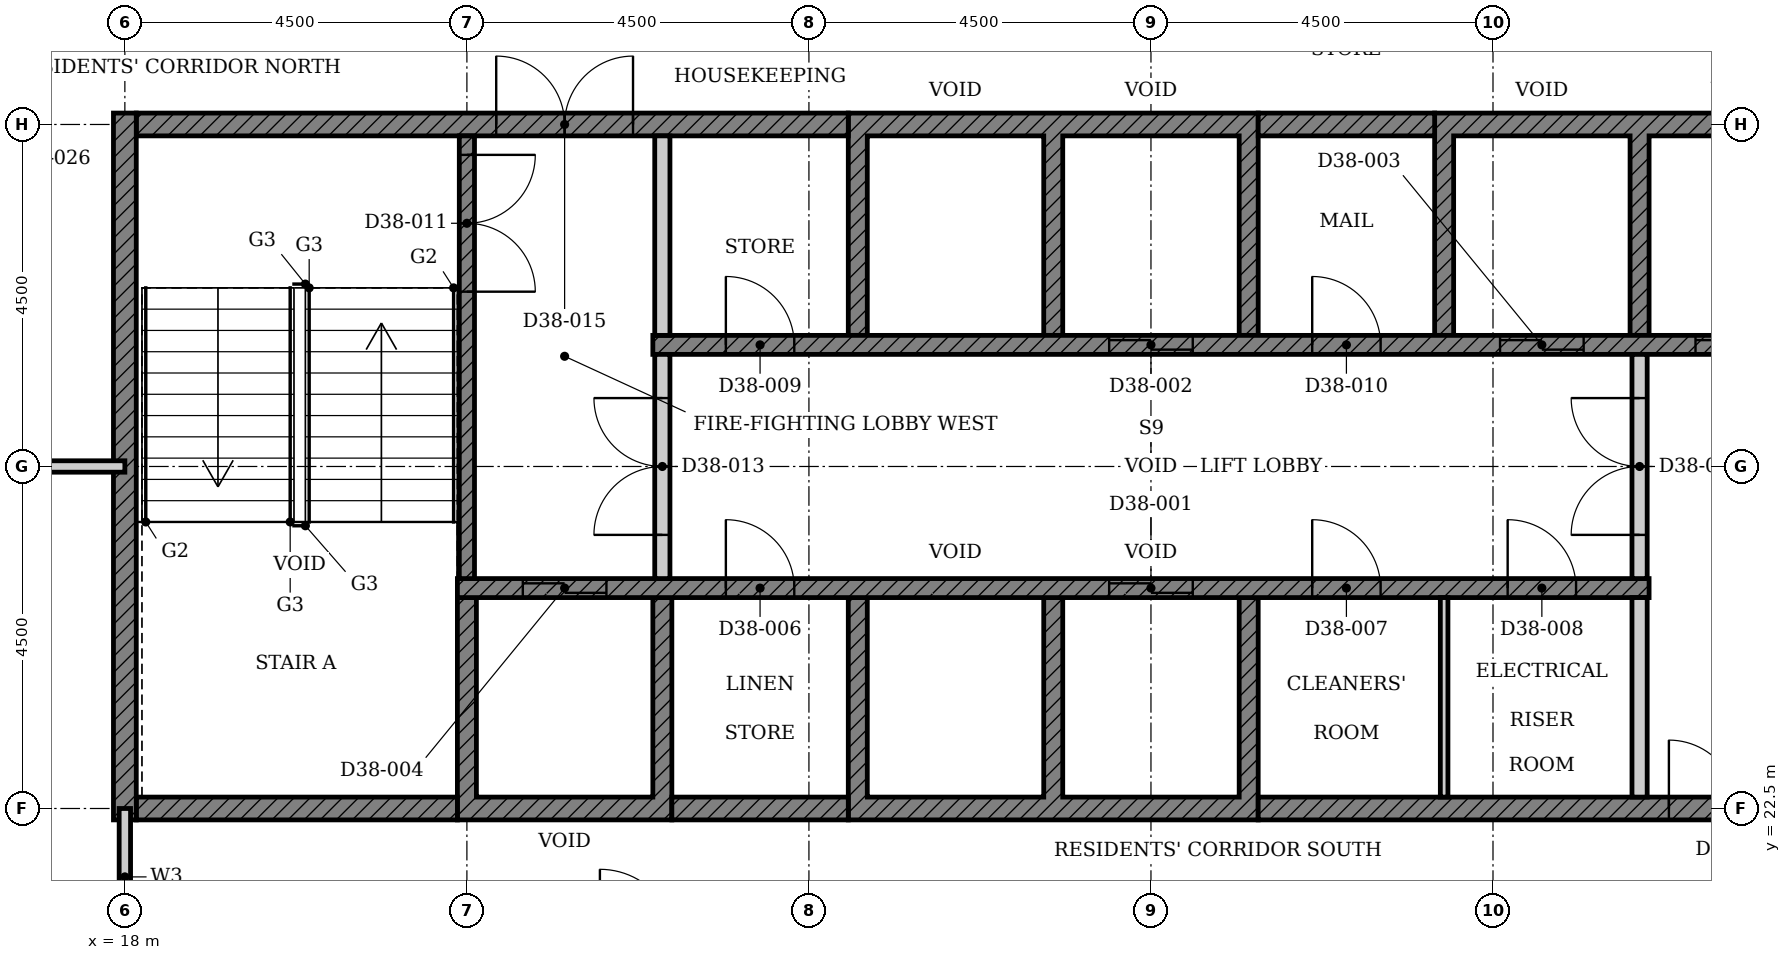
"""IFC4 building model, lengths in metres.
Left out: names, types, materials, properties, quantities, classifications, styles, units other than length and angle.
Written with IfcOpenShell. Run it as: python <this file> out.ifc"""

import sys

from ifc_helpers import new_model, si_unit, direction, frame, frame_2d, origin, place, context, subcontext, project, spatial, polyline, rectangle, outline, extrude, element, fill, save


model = new_model("IFC4")
c1 = context("Model", 3, precision=1e-05, world=origin(), true_north=direction((0.0, 1.0)))
c2 = subcontext(c1, "Body", "Model", "MODEL_VIEW")
j1 = project(units=[si_unit("LENGTHUNIT", "METRE"), si_unit("PLANEANGLEUNIT", "RADIAN")], contexts=[c1])
p1 = place(None, origin())
s1 = spatial("IfcSite", under=j1, at=p1, CompositionType="ELEMENT")
p2 = place(p1, origin())
s2 = spatial("IfcBuilding", under=s1, at=p2, CompositionType="ELEMENT")
p3 = place(p2, frame((0.0, 0.0, 154.3)))
s3 = spatial("IfcBuildingStorey", under=s2, at=p3, CompositionType="ELEMENT", Elevation=154.3)
p4 = place(p3, origin())
e1 = element("IfcWall", 1, at=p4, inside=s3, PredefinedType="SHEAR", context=c2, shape_type="SweptSolid", body=[
    extrude(outline(polyline([(22.375, 22.35), (25.197, 22.35), (25.197, 25.275), (24.947, 25.275), (24.947, 22.65), (22.625, 22.65), (22.625, 25.275), (22.375, 25.275), (22.375, 22.35)])), origin(), (0.0, 0.0, 1.0), 3.4),
])
p5 = place(p3, origin())
e2 = element("IfcWall", 2, at=p5, inside=s3, PredefinedType="SHEAR", context=c2, shape_type="SweptSolid", body=[
    extrude(outline(polyline([(27.518, 22.35), (32.911, 22.35), (32.911, 25.275), (32.661, 25.275), (32.661, 22.65), (30.339, 22.65), (30.339, 25.275), (30.089, 25.275), (30.089, 22.65), (27.768, 22.65), (27.768, 25.275), (27.518, 25.275), (27.518, 22.35)])), origin(), (0.0, 0.0, 1.0), 3.4),
])
p6 = place(p3, origin())
e3 = element("IfcWall", 3, at=p6, inside=s3, PredefinedType="SHEAR", context=c2, shape_type="SweptSolid", body=[
    extrude(outline(polyline([(27.518, 28.725), (27.768, 28.725), (27.768, 31.35), (30.089, 31.35), (30.089, 28.725), (30.339, 28.725), (30.339, 31.35), (32.661, 31.35), (32.661, 28.725), (32.911, 28.725), (32.911, 31.65), (27.518, 31.65), (27.518, 28.725)])), origin(), (0.0, 0.0, 1.0), 3.4),
])
p7 = place(p3, origin())
e4 = element("IfcWall", 4, at=p7, inside=s3, PredefinedType="SHEAR", context=c2, shape_type="SweptSolid", body=[
    extrude(outline(polyline([(35.232, 28.725), (35.482, 28.725), (35.482, 31.35), (37.803, 31.35), (37.803, 28.725), (38.053, 28.725), (38.053, 31.35), (40.375, 31.35), (40.375, 28.725), (40.625, 28.725), (40.625, 31.65), (35.232, 31.65), (35.232, 28.725)])), origin(), (0.0, 0.0, 1.0), 3.4),
])
p8 = place(p3, frame((18.15, 22.5, 0.0), z_axis=(0.0, 0.0, 1.0), x_axis=(1.0, 0.0, 0.0)))
e5 = element("IfcWall", 5, at=p8, inside=s3, PredefinedType="SHEAR", context=c2, shape_type="SweptSolid", body=[
    extrude(rectangle(XDim=4.225, YDim=0.3, at=frame_2d((2.113, 0.0))), origin(), (0.0, 0.0, 1.0), 3.4),
])
p9 = place(p3, frame((25.197, 22.5, 0.0), z_axis=(0.0, 0.0, 1.0), x_axis=(1.0, 0.0, 0.0)))
e6 = element("IfcWall", 6, at=p9, inside=s3, PredefinedType="SHEAR", context=c2, shape_type="SweptSolid", body=[
    extrude(rectangle(XDim=2.321, YDim=0.3, at=frame_2d((1.161, 0.0))), origin(), (0.0, 0.0, 1.0), 3.4),
])
p10 = place(p3, frame((32.911, 22.5, 0.0), z_axis=(0.0, 0.0, 1.0), x_axis=(1.0, 0.0, 0.0)))
e7 = element("IfcWall", 7, at=p10, inside=s3, PredefinedType="SHEAR", context=c2, shape_type="SweptSolid", body=[
    extrude(rectangle(XDim=11.939, YDim=0.3, at=frame_2d((5.97, 0.0))), origin(), (0.0, 0.0, 1.0), 3.4),
])
p11 = place(p10, frame((5.404, 0.0, 0.0)))
e8 = element("IfcOpeningElement", 8, at=p11, cuts=e7, PredefinedType="OPENING", context=c2, shape_type="SweptSolid", body=[
    extrude(rectangle(XDim=1.8, YDim=2.1, at=frame_2d((0.9, 1.05))), frame((0.0, 0.16, 0.0), z_axis=(0.0, -1.0, 0.0), x_axis=(1.0, 0.0, 0.0)), (0.0, 0.0, 1.0), 0.32),
])
p12 = place(p3, frame((18.15, 31.5, 0.0), z_axis=(0.0, 0.0, 1.0), x_axis=(1.0, 0.0, 0.0)))
e9 = element("IfcWall", 9, at=p12, inside=s3, PredefinedType="SHEAR", context=c2, shape_type="SweptSolid", body=[
    extrude(rectangle(XDim=9.368, YDim=0.3, at=frame_2d((4.684, 0.0))), origin(), (0.0, 0.0, 1.0), 3.4),
])
p13 = place(p12, frame((4.736, 0.0, 0.0)))
e10 = element("IfcOpeningElement", 10, at=p13, cuts=e9, PredefinedType="OPENING", context=c2, shape_type="SweptSolid", body=[
    extrude(rectangle(XDim=1.8, YDim=2.1, at=frame_2d((0.9, 1.05))), frame((0.0, 0.16, 0.0), z_axis=(0.0, -1.0, 0.0), x_axis=(1.0, 0.0, 0.0)), (0.0, 0.0, 1.0), 0.32),
])
p14 = place(p3, frame((32.911, 31.5, 0.0), z_axis=(0.0, 0.0, 1.0), x_axis=(1.0, 0.0, 0.0)))
e11 = element("IfcWall", 11, at=p14, inside=s3, PredefinedType="SHEAR", context=c2, shape_type="SweptSolid", body=[
    extrude(rectangle(XDim=2.322, YDim=0.3, at=frame_2d((1.161, 0.0))), origin(), (0.0, 0.0, 1.0), 3.4),
])
p15 = place(p3, frame((18.0, 22.35, 0.0), z_axis=(0.0, 0.0, 1.0), x_axis=(0.0, 1.0, 0.0)))
e12 = element("IfcWall", 12, at=p15, inside=s3, PredefinedType="SHEAR", context=c2, shape_type="SweptSolid", body=[
    extrude(rectangle(XDim=9.3, YDim=0.3, at=frame_2d((4.65, 0.0))), origin(), (0.0, 0.0, 1.0), 3.4),
])
p16 = place(p3, frame((22.375, 25.4, 0.0), z_axis=(0.0, 0.0, 1.0), x_axis=(1.0, 0.0, 0.0)))
e13 = element("IfcWall", 13, at=p16, inside=s3, PredefinedType="SHEAR", context=c2, shape_type="SweptSolid", body=[
    extrude(rectangle(XDim=15.678, YDim=0.25, at=frame_2d((7.839, 0.0))), origin(), (0.0, 0.0, 1.0), 3.4),
])
p17 = place(p16, frame((8.575, 0.0, 0.0)))
e14 = element("IfcOpeningElement", 14, at=p17, cuts=e13, PredefinedType="OPENING", context=c2, shape_type="SweptSolid", body=[
    extrude(rectangle(XDim=1.1, YDim=2.1, at=frame_2d((0.55, 1.05))), frame((0.0, 0.135, 0.0), z_axis=(0.0, -1.0, 0.0), x_axis=(1.0, 0.0, 0.0)), (0.0, 0.0, 1.0), 0.27),
])
p18 = place(p16, frame((0.861, 0.0, 0.0)))
e15 = element("IfcOpeningElement", 15, at=p18, cuts=e13, PredefinedType="OPENING", context=c2, shape_type="SweptSolid", body=[
    extrude(rectangle(XDim=1.1, YDim=2.1, at=frame_2d((0.55, 1.05))), frame((0.0, 0.135, 0.0), z_axis=(0.0, -1.0, 0.0), x_axis=(1.0, 0.0, 0.0)), (0.0, 0.0, 1.0), 0.27),
])
p19 = place(p16, frame((3.532, 0.0, 0.0)))
e16 = element("IfcOpeningElement", 16, at=p19, cuts=e13, PredefinedType="OPENING", context=c2, shape_type="SweptSolid", body=[
    extrude(rectangle(XDim=0.9, YDim=2.1, at=frame_2d((0.45, 1.05))), frame((0.0, 0.135, 0.0), z_axis=(0.0, -1.0, 0.0), x_axis=(1.0, 0.0, 0.0)), (0.0, 0.0, 1.0), 0.27),
])
p20 = place(p16, frame((11.246, 0.0, 0.0)))
e17 = element("IfcOpeningElement", 17, at=p20, cuts=e13, PredefinedType="OPENING", context=c2, shape_type="SweptSolid", body=[
    extrude(rectangle(XDim=0.9, YDim=2.1, at=frame_2d((0.45, 1.05))), frame((0.0, 0.135, 0.0), z_axis=(0.0, -1.0, 0.0), x_axis=(1.0, 0.0, 0.0)), (0.0, 0.0, 1.0), 0.27),
])
p21 = place(p16, frame((13.818, 0.0, 0.0)))
e18 = element("IfcOpeningElement", 18, at=p21, cuts=e13, PredefinedType="OPENING", context=c2, shape_type="SweptSolid", body=[
    extrude(rectangle(XDim=0.9, YDim=2.1, at=frame_2d((0.45, 1.05))), frame((0.0, 0.135, 0.0), z_axis=(0.0, -1.0, 0.0), x_axis=(1.0, 0.0, 0.0)), (0.0, 0.0, 1.0), 0.27),
])
p22 = place(p3, frame((24.947, 28.6, 0.0), z_axis=(0.0, 0.0, 1.0), x_axis=(1.0, 0.0, 0.0)))
e19 = element("IfcWall", 19, at=p22, inside=s3, PredefinedType="SHEAR", context=c2, shape_type="SweptSolid", body=[
    extrude(rectangle(XDim=15.678, YDim=0.25, at=frame_2d((7.839, 0.0))), origin(), (0.0, 0.0, 1.0), 3.4),
])
p23 = place(p22, frame((6.004, 0.0, 0.0)))
e20 = element("IfcOpeningElement", 20, at=p23, cuts=e19, PredefinedType="OPENING", context=c2, shape_type="SweptSolid", body=[
    extrude(rectangle(XDim=1.1, YDim=2.1, at=frame_2d((0.55, 1.05))), frame((0.0, 0.135, 0.0), z_axis=(0.0, -1.0, 0.0), x_axis=(1.0, 0.0, 0.0)), (0.0, 0.0, 1.0), 0.27),
])
p24 = place(p22, frame((11.146, 0.0, 0.0)))
e21 = element("IfcOpeningElement", 21, at=p24, cuts=e19, PredefinedType="OPENING", context=c2, shape_type="SweptSolid", body=[
    extrude(rectangle(XDim=1.1, YDim=2.1, at=frame_2d((0.55, 1.05))), frame((0.0, 0.135, 0.0), z_axis=(0.0, -1.0, 0.0), x_axis=(1.0, 0.0, 0.0)), (0.0, 0.0, 1.0), 0.27),
])
p25 = place(p22, frame((13.718, 0.0, 0.0)))
e22 = element("IfcOpeningElement", 22, at=p25, cuts=e19, PredefinedType="OPENING", context=c2, shape_type="SweptSolid", body=[
    extrude(rectangle(XDim=1.1, YDim=2.1, at=frame_2d((0.55, 1.05))), frame((0.0, 0.135, 0.0), z_axis=(0.0, -1.0, 0.0), x_axis=(1.0, 0.0, 0.0)), (0.0, 0.0, 1.0), 0.27),
])
p26 = place(p22, frame((0.961, 0.0, 0.0)))
e23 = element("IfcOpeningElement", 23, at=p26, cuts=e19, PredefinedType="OPENING", context=c2, shape_type="SweptSolid", body=[
    extrude(rectangle(XDim=0.9, YDim=2.1, at=frame_2d((0.45, 1.05))), frame((0.0, 0.135, 0.0), z_axis=(0.0, -1.0, 0.0), x_axis=(1.0, 0.0, 0.0)), (0.0, 0.0, 1.0), 0.27),
])
p27 = place(p22, frame((8.675, 0.0, 0.0)))
e24 = element("IfcOpeningElement", 24, at=p27, cuts=e19, PredefinedType="OPENING", context=c2, shape_type="SweptSolid", body=[
    extrude(rectangle(XDim=0.9, YDim=2.1, at=frame_2d((0.45, 1.05))), frame((0.0, 0.135, 0.0), z_axis=(0.0, -1.0, 0.0), x_axis=(1.0, 0.0, 0.0)), (0.0, 0.0, 1.0), 0.27),
])
p28 = place(p3, frame((37.928, 22.65, 0.0), z_axis=(0.0, 0.0, 1.0), x_axis=(0.0, 1.0, 0.0)))
e25 = element("IfcWall", 25, at=p28, inside=s3, PredefinedType="PARTITIONING", context=c2, shape_type="SweptSolid", body=[
    extrude(rectangle(XDim=2.625, YDim=0.2, at=frame_2d((1.312, 0.0))), origin(), (0.0, 0.0, 1.0), 3.4),
])
p29 = place(p3, frame((35.357, 22.65, 0.0), z_axis=(0.0, 0.0, 1.0), x_axis=(0.0, 1.0, 0.0)))
e26 = element("IfcWall", 26, at=p29, inside=s3, PredefinedType="PARTITIONING", context=c2, shape_type="SweptSolid", body=[
    extrude(rectangle(XDim=2.625, YDim=0.1, at=frame_2d((1.312, 0.0))), origin(), (0.0, 0.0, 1.0), 3.4),
])
p30 = place(p3, frame((25.072, 28.725, 0.0), z_axis=(0.0, 0.0, 1.0), x_axis=(0.0, 1.0, 0.0)))
e27 = element("IfcWall", 27, at=p30, inside=s3, PredefinedType="PARTITIONING", context=c2, shape_type="SweptSolid", body=[
    extrude(rectangle(XDim=2.625, YDim=0.2, at=frame_2d((1.312, 0.0))), origin(), (0.0, 0.0, 1.0), 3.4),
])
p31 = place(p3, frame((22.5, 31.35, 0.0), z_axis=(0.0, 0.0, 1.0), x_axis=(0.0, -1.0, 0.0)))
e28 = element("IfcWall", 28, at=p31, inside=s3, PredefinedType="SHEAR", context=c2, shape_type="SweptSolid", body=[
    extrude(rectangle(XDim=5.825, YDim=0.2, at=frame_2d((2.913, 0.0))), origin(), (0.0, 0.0, 1.0), 3.4),
])
p32 = place(p31, frame((0.25, 0.0, 0.0)))
e29 = element("IfcOpeningElement", 29, at=p32, cuts=e28, PredefinedType="OPENING", context=c2, shape_type="SweptSolid", body=[
    extrude(rectangle(XDim=1.8, YDim=2.1, at=frame_2d((0.9, 1.05))), frame((0.0, 0.11, 0.0), z_axis=(0.0, -1.0, 0.0), x_axis=(1.0, 0.0, 0.0)), (0.0, 0.0, 1.0), 0.22),
])
p33 = place(p3, frame((25.072, 25.525, 0.0), z_axis=(0.0, 0.0, 1.0), x_axis=(0.0, 1.0, 0.0)))
e30 = element("IfcWall", 30, at=p33, inside=s3, PredefinedType="PARTITIONING", context=c2, shape_type="SweptSolid", body=[
    extrude(rectangle(XDim=2.95, YDim=0.2, at=frame_2d((1.475, 0.0))), origin(), (0.0, 0.0, 1.0), 3.4),
])
p34 = place(p33, frame((0.575, 0.0, 0.0)))
e31 = element("IfcOpeningElement", 31, at=p34, cuts=e30, PredefinedType="OPENING", context=c2, shape_type="SweptSolid", body=[
    extrude(rectangle(XDim=1.8, YDim=2.1, at=frame_2d((0.9, 1.05))), frame((0.0, 0.11, 0.0), z_axis=(0.0, -1.0, 0.0), x_axis=(1.0, 0.0, 0.0)), (0.0, 0.0, 1.0), 0.22),
])
p35 = place(p3, frame((37.928, 25.525, 0.0), z_axis=(0.0, 0.0, 1.0), x_axis=(0.0, 1.0, 0.0)))
e32 = element("IfcWall", 32, at=p35, inside=s3, PredefinedType="PARTITIONING", context=c2, shape_type="SweptSolid", body=[
    extrude(rectangle(XDim=2.95, YDim=0.2, at=frame_2d((1.475, 0.0))), origin(), (0.0, 0.0, 1.0), 3.4),
])
p36 = place(p35, frame((0.575, 0.0, 0.0)))
e33 = element("IfcOpeningElement", 33, at=p36, cuts=e32, PredefinedType="OPENING", context=c2, shape_type="SweptSolid", body=[
    extrude(rectangle(XDim=1.8, YDim=2.1, at=frame_2d((0.9, 1.05))), frame((0.0, 0.11, 0.0), z_axis=(0.0, -1.0, 0.0), x_axis=(1.0, 0.0, 0.0)), (0.0, 0.0, 1.0), 0.22),
])
p37 = place(p3, frame((4.5, 27.0, 0.0), z_axis=(0.0, 0.0, 1.0), x_axis=(1.0, 0.0, 0.0)))
e34 = element("IfcWall", 34, at=p37, inside=s3, PredefinedType="PARTITIONING", context=c2, shape_type="SweptSolid", body=[
    extrude(rectangle(XDim=13.5, YDim=0.15, at=frame_2d((6.75, 0.0))), origin(), (0.0, 0.0, 1.0), 2.68),
])
p38 = place(p37, frame((5.35, 0.0, 0.0)))
e35 = element("IfcOpeningElement", 35, at=p38, cuts=e34, PredefinedType="OPENING", context=c2, shape_type="SweptSolid", body=[
    extrude(rectangle(XDim=1.0, YDim=2.1, at=frame_2d((0.5, 1.05))), frame((0.0, 0.085, 0.0), z_axis=(0.0, -1.0, 0.0), x_axis=(1.0, 0.0, 0.0)), (0.0, 0.0, 1.0), 0.17),
])
p39 = place(p3, frame((18.0, 20.7, 0.0), z_axis=(0.0, 0.0, 1.0), x_axis=(0.0, 1.0, 0.0)))
e36 = element("IfcWall", 36, at=p39, inside=s3, PredefinedType="PARTITIONING", context=c2, shape_type="SweptSolid", body=[
    extrude(rectangle(XDim=1.8, YDim=0.15, at=frame_2d((0.9, 0.0))), origin(), (0.0, 0.0, 1.0), 3.4),
])
p40 = place(p17, origin())
e37 = element("IfcDoor", 37, at=p40, inside=s3, OperationType="DOUBLE_DOOR_SLIDING", PredefinedType="DOOR", context=c2, shape_type="SweptSolid", body=[
    extrude(rectangle(XDim=1.1, YDim=2.1, at=frame_2d((0.55, 1.05))), frame((0.0, 0.025, 0.0), z_axis=(0.0, -1.0, 0.0), x_axis=(1.0, 0.0, 0.0)), (0.0, 0.0, 1.0), 0.05),
])
fill(e14, e37)
p41 = place(p23, origin())
e38 = element("IfcDoor", 38, at=p41, inside=s3, OperationType="DOUBLE_DOOR_SLIDING", PredefinedType="DOOR", context=c2, shape_type="SweptSolid", body=[
    extrude(rectangle(XDim=1.1, YDim=2.1, at=frame_2d((0.55, 1.05))), frame((0.0, 0.025, 0.0), z_axis=(0.0, -1.0, 0.0), x_axis=(1.0, 0.0, 0.0)), (0.0, 0.0, 1.0), 0.05),
])
fill(e20, e38)
p42 = place(p24, origin())
e39 = element("IfcDoor", 39, at=p42, inside=s3, OperationType="DOUBLE_DOOR_SLIDING", PredefinedType="DOOR", context=c2, shape_type="SweptSolid", body=[
    extrude(rectangle(XDim=1.1, YDim=2.1, at=frame_2d((0.55, 1.05))), frame((0.0, 0.025, 0.0), z_axis=(0.0, -1.0, 0.0), x_axis=(1.0, 0.0, 0.0)), (0.0, 0.0, 1.0), 0.05),
])
fill(e21, e39)
p43 = place(p18, origin())
e40 = element("IfcDoor", 40, at=p43, inside=s3, OperationType="DOUBLE_DOOR_SLIDING", PredefinedType="DOOR", context=c2, shape_type="SweptSolid", body=[
    extrude(rectangle(XDim=1.1, YDim=2.1, at=frame_2d((0.55, 1.05))), frame((0.0, 0.025, 0.0), z_axis=(0.0, -1.0, 0.0), x_axis=(1.0, 0.0, 0.0)), (0.0, 0.0, 1.0), 0.05),
])
fill(e15, e40)
p44 = place(p25, origin())
e41 = element("IfcDoor", 41, at=p44, inside=s3, OperationType="DOUBLE_DOOR_SLIDING", PredefinedType="DOOR", context=c2, shape_type="SweptSolid", body=[
    extrude(rectangle(XDim=1.1, YDim=2.1, at=frame_2d((0.55, 1.05))), frame((0.0, 0.025, 0.0), z_axis=(0.0, -1.0, 0.0), x_axis=(1.0, 0.0, 0.0)), (0.0, 0.0, 1.0), 0.05),
])
fill(e22, e41)
p45 = place(p19, origin())
e42 = element("IfcDoor", 42, at=p45, inside=s3, OperationType="SINGLE_SWING_LEFT", PredefinedType="DOOR", context=c2, shape_type="SweptSolid", body=[
    extrude(rectangle(XDim=0.9, YDim=2.1, at=frame_2d((0.45, 1.05))), frame((0.0, 0.025, 0.0), z_axis=(0.0, -1.0, 0.0), x_axis=(1.0, 0.0, 0.0)), (0.0, 0.0, 1.0), 0.05),
])
fill(e16, e42)
p46 = place(p20, origin())
e43 = element("IfcDoor", 43, at=p46, inside=s3, OperationType="SINGLE_SWING_LEFT", PredefinedType="DOOR", context=c2, shape_type="SweptSolid", body=[
    extrude(rectangle(XDim=0.9, YDim=2.1, at=frame_2d((0.45, 1.05))), frame((0.0, 0.025, 0.0), z_axis=(0.0, -1.0, 0.0), x_axis=(1.0, 0.0, 0.0)), (0.0, 0.0, 1.0), 0.05),
])
fill(e17, e43)
p47 = place(p21, origin())
e44 = element("IfcDoor", 44, at=p47, inside=s3, OperationType="SINGLE_SWING_LEFT", PredefinedType="DOOR", context=c2, shape_type="SweptSolid", body=[
    extrude(rectangle(XDim=0.9, YDim=2.1, at=frame_2d((0.45, 1.05))), frame((0.0, 0.025, 0.0), z_axis=(0.0, -1.0, 0.0), x_axis=(1.0, 0.0, 0.0)), (0.0, 0.0, 1.0), 0.05),
])
fill(e18, e44)
p48 = place(p26, origin())
e45 = element("IfcDoor", 45, at=p48, inside=s3, OperationType="SINGLE_SWING_LEFT", PredefinedType="DOOR", context=c2, shape_type="SweptSolid", body=[
    extrude(rectangle(XDim=0.9, YDim=2.1, at=frame_2d((0.45, 1.05))), frame((0.0, 0.025, 0.0), z_axis=(0.0, -1.0, 0.0), x_axis=(1.0, 0.0, 0.0)), (0.0, 0.0, 1.0), 0.05),
])
fill(e23, e45)
p49 = place(p27, origin())
e46 = element("IfcDoor", 46, at=p49, inside=s3, OperationType="SINGLE_SWING_LEFT", PredefinedType="DOOR", context=c2, shape_type="SweptSolid", body=[
    extrude(rectangle(XDim=0.9, YDim=2.1, at=frame_2d((0.45, 1.05))), frame((0.0, 0.025, 0.0), z_axis=(0.0, -1.0, 0.0), x_axis=(1.0, 0.0, 0.0)), (0.0, 0.0, 1.0), 0.05),
])
fill(e24, e46)
p50 = place(p32, origin())
e47 = element("IfcDoor", 47, at=p50, inside=s3, OperationType="DOUBLE_DOOR_SINGLE_SWING", PredefinedType="DOOR", context=c2, shape_type="SweptSolid", body=[
    extrude(rectangle(XDim=1.8, YDim=2.1, at=frame_2d((0.9, 1.05))), frame((0.0, 0.025, 0.0), z_axis=(0.0, -1.0, 0.0), x_axis=(1.0, 0.0, 0.0)), (0.0, 0.0, 1.0), 0.05),
])
fill(e29, e47)
p51 = place(p34, origin())
e48 = element("IfcDoor", 48, at=p51, inside=s3, OperationType="DOUBLE_DOOR_SINGLE_SWING", PredefinedType="DOOR", context=c2, shape_type="SweptSolid", body=[
    extrude(rectangle(XDim=1.8, YDim=2.1, at=frame_2d((0.9, 1.05))), frame((0.0, 0.025, 0.0), z_axis=(0.0, -1.0, 0.0), x_axis=(1.0, 0.0, 0.0)), (0.0, 0.0, 1.0), 0.05),
])
fill(e31, e48)
p52 = place(p36, origin())
e49 = element("IfcDoor", 49, at=p52, inside=s3, OperationType="DOUBLE_DOOR_SINGLE_SWING", PredefinedType="DOOR", context=c2, shape_type="SweptSolid", body=[
    extrude(rectangle(XDim=1.8, YDim=2.1, at=frame_2d((0.9, 1.05))), frame((0.0, 0.025, 0.0), z_axis=(0.0, -1.0, 0.0), x_axis=(1.0, 0.0, 0.0)), (0.0, 0.0, 1.0), 0.05),
])
fill(e33, e49)
p53 = place(p13, origin())
e50 = element("IfcDoor", 50, at=p53, inside=s3, OperationType="DOUBLE_DOOR_SINGLE_SWING", PredefinedType="DOOR", context=c2, shape_type="SweptSolid", body=[
    extrude(rectangle(XDim=1.8, YDim=2.1, at=frame_2d((0.9, 1.05))), frame((0.0, 0.025, 0.0), z_axis=(0.0, -1.0, 0.0), x_axis=(1.0, 0.0, 0.0)), (0.0, 0.0, 1.0), 0.05),
])
fill(e10, e50)
p54 = place(p11, origin())
e51 = element("IfcDoor", 51, at=p54, inside=s3, OperationType="DOUBLE_DOOR_SINGLE_SWING", PredefinedType="DOOR", context=c2, shape_type="SweptSolid", body=[
    extrude(rectangle(XDim=1.8, YDim=2.1, at=frame_2d((0.9, 1.05))), frame((0.0, 0.025, 0.0), z_axis=(0.0, -1.0, 0.0), x_axis=(1.0, 0.0, 0.0)), (0.0, 0.0, 1.0), 0.05),
])
fill(e8, e51)
save(model, sys.argv[1])
